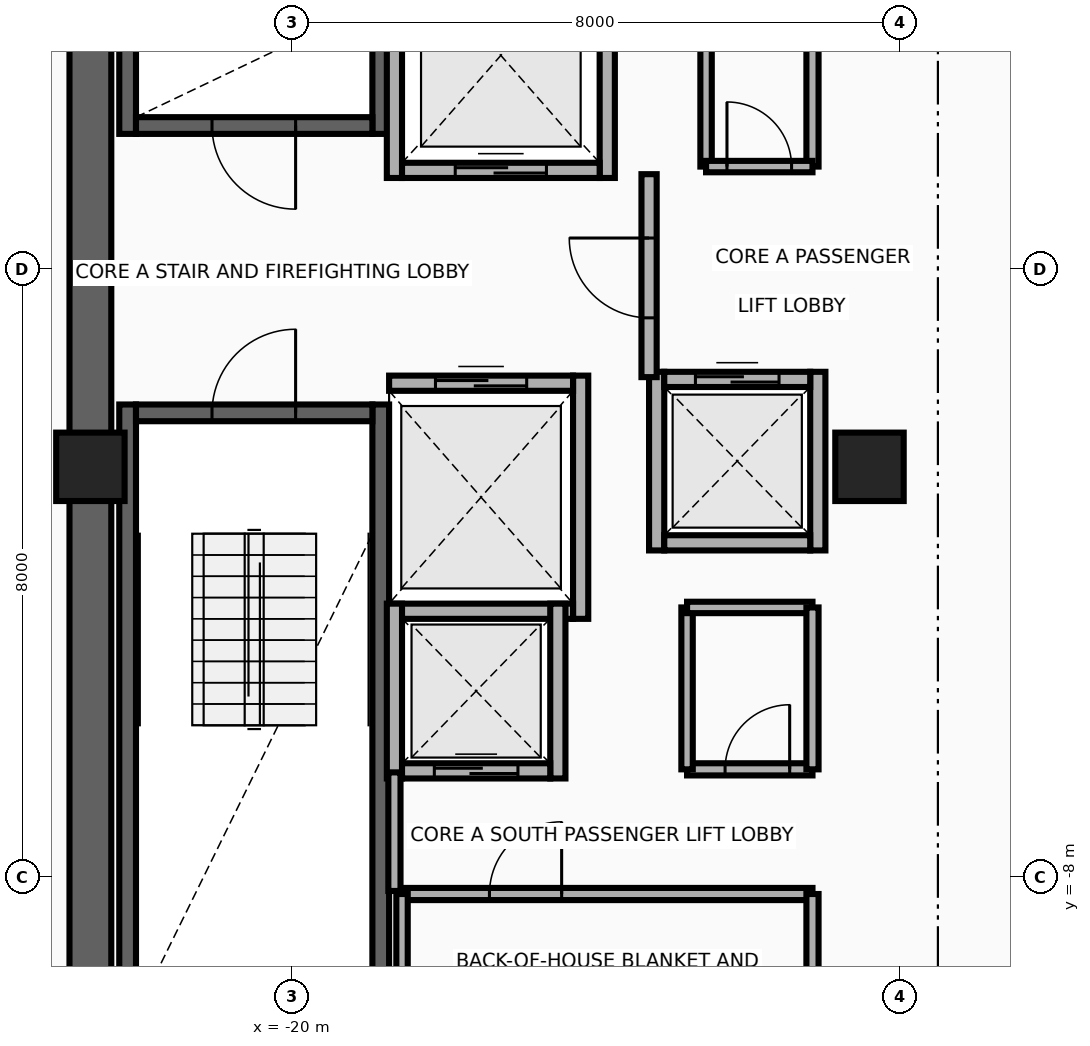
"""IFC4 building model, lengths in metres.
Left out: names, types, materials, properties, quantities, classifications, styles, units other than length and angle.
Written with IfcOpenShell. Run it as: python <this file> out.ifc"""

import sys

from ifc_helpers import new_model, si_unit, direction, frame, frame_2d, origin, origin_2d, place, context, subcontext, project, spatial, rectangle, extrude, source, transform, mapped, element, fill, save


model = new_model("IFC4")
c1 = context("Model", 3, precision=1e-05, world=origin(), true_north=direction((0.0, 1.0)))
c2 = subcontext(c1, "Body", "Model", "MODEL_VIEW")
j1 = project(units=[si_unit("LENGTHUNIT", "METRE"), si_unit("PLANEANGLEUNIT", "RADIAN")], contexts=[c1])
p1 = place(None, origin())
s1 = spatial("IfcSite", under=j1, at=p1, CompositionType="ELEMENT")
p2 = place(p1, origin())
s2 = spatial("IfcBuilding", under=s1, at=p2, CompositionType="ELEMENT")
p3 = place(p2, frame((0.0, 0.0, 212.5)))
s3 = spatial("IfcBuildingStorey", under=s2, at=p3, CompositionType="ELEMENT", Elevation=212.5)
for number, where, z_axis, x_axis in (
    (1, (-22.16, 1.78, 0.0), (0.0, 0.0, 1.0), (0.0, 1.0, 0.0)),
    (2, (-18.83, 1.78, 0.0), (0.0, 0.0, 1.0), (0.0, 1.0, 0.0)),
):
    element("IfcWall", number, at=place(p3, frame(where, z_axis=z_axis, x_axis=x_axis)), inside=s3, PredefinedType="SHEAR", context=c2, shape_type="SweptSolid", body=[
        extrude(rectangle(XDim=8.745, YDim=0.22, at=frame_2d((4.373, 0.0))), origin(), (0.0, 0.0, 1.0), 3.26),
    ])
p4 = place(p3, frame((-22.05, 1.89, 0.0), z_axis=(0.0, 0.0, 1.0), x_axis=(1.0, 0.0, 0.0)))
e3 = element("IfcWall", 3, at=p4, inside=s3, PredefinedType="SHEAR", context=c2, shape_type="SweptSolid", body=[
    extrude(rectangle(XDim=3.11, YDim=0.22, at=frame_2d((1.555, 0.0))), origin(), (0.0, 0.0, 1.0), 3.26),
])
p5 = place(p4, frame((1.0, 0.0, 0.0)))
e4 = element("IfcOpeningElement", 4, at=p5, cuts=e3, PredefinedType="OPENING", context=c2, shape_type="SweptSolid", body=[
    extrude(rectangle(XDim=1.1, YDim=2.15, at=frame_2d((0.55, 1.075))), frame((0.0, 0.125, 0.0), z_axis=(0.0, -1.0, 0.0), x_axis=(1.0, 0.0, 0.0)), (0.0, 0.0, 1.0), 0.25),
])
for number, where, z_axis, x_axis in (
    (5, (-22.16, -10.525, 0.0), (0.0, 0.0, 1.0), (0.0, 1.0, 0.0)),
    (6, (-18.83, -10.525, 0.0), (0.0, 0.0, 1.0), (0.0, 1.0, 0.0)),
):
    element("IfcWall", number, at=place(p3, frame(where, z_axis=z_axis, x_axis=x_axis)), inside=s3, PredefinedType="SHEAR", context=c2, shape_type="SweptSolid", body=[
        extrude(rectangle(XDim=8.745, YDim=0.22, at=frame_2d((4.373, 0.0))), origin(), (0.0, 0.0, 1.0), 3.26),
    ])
p6 = place(p3, frame((-22.05, -1.89, 0.0), z_axis=(0.0, 0.0, 1.0), x_axis=(1.0, 0.0, 0.0)))
e7 = element("IfcWall", 7, at=p6, inside=s3, PredefinedType="SHEAR", context=c2, shape_type="SweptSolid", body=[
    extrude(rectangle(XDim=3.11, YDim=0.22, at=frame_2d((1.555, 0.0))), origin(), (0.0, 0.0, 1.0), 3.26),
])
p7 = place(p6, frame((1.0, 0.0, 0.0)))
e8 = element("IfcOpeningElement", 8, at=p7, cuts=e7, PredefinedType="OPENING", context=c2, shape_type="SweptSolid", body=[
    extrude(rectangle(XDim=1.1, YDim=2.15, at=frame_2d((0.55, 1.075))), frame((0.0, 0.125, 0.0), z_axis=(0.0, -1.0, 0.0), x_axis=(1.0, 0.0, 0.0)), (0.0, 0.0, 1.0), 0.25),
])
p8 = place(p3, frame((-22.65, -11.075, 0.0), z_axis=(0.0, 0.0, 1.0), x_axis=(0.0, 1.0, 0.0)))
e9 = element("IfcWall", 9, at=p8, inside=s3, PredefinedType="SHEAR", context=c2, shape_type="SweptSolid", body=[
    extrude(rectangle(XDim=22.15, YDim=0.55, at=frame_2d((11.075, 0.0))), origin(), (0.0, 0.0, 1.0), 3.26),
])
m1 = source(origin(), c2, "Body", "SweptSolid", [
    extrude(rectangle(XDim=0.9, YDim=0.9, at=origin_2d()), origin(), (0.0, 0.0, 1.0), 3.5),
])
for number, where, z_axis, x_axis in (
    (10, (-22.65, -2.6, 0.0), (0.0, 0.0, 1.0), (1.0, 0.0, 0.0)),
    (11, (-12.4, -2.6, 0.0), (0.0, 0.0, 1.0), (1.0, 0.0, 0.0)),
):
    element("IfcColumn", number, at=place(p3, frame(where, z_axis=z_axis, x_axis=x_axis)), inside=s3, PredefinedType="COLUMN", context=c2, shape_type="MappedRepresentation", body=[
        mapped(m1, transform((0.0, 0.0, 0.0), x_axis=(1.0, 0.0, 0.0), y_axis=(0.0, 1.0, 0.0), z_axis=(0.0, 0.0, 1.0), scale=1.0)),
    ])
for number, where, z_axis, x_axis in (
    (12, (-18.65, 1.2, 0.0), (0.0, 0.0, 1.0), (0.0, 1.0, 0.0)),
    (13, (-15.85, 1.2, 0.0), (0.0, 0.0, 1.0), (0.0, 1.0, 0.0)),
):
    element("IfcWall", number, at=place(p3, frame(where, z_axis=z_axis, x_axis=x_axis)), inside=s3, PredefinedType="MOVABLE", context=c2, shape_type="SweptSolid", body=[
        extrude(rectangle(XDim=3.225, YDim=0.2, at=frame_2d((1.613, 0.0))), origin(), (0.0, 0.0, 1.0), 3.26),
    ])
p9 = place(p3, frame((-18.55, 1.3, 0.0), z_axis=(0.0, 0.0, 1.0), x_axis=(1.0, 0.0, 0.0)))
e14 = element("IfcWall", 14, at=p9, inside=s3, PredefinedType="MOVABLE", context=c2, shape_type="SweptSolid", body=[
    extrude(rectangle(XDim=2.6, YDim=0.2, at=frame_2d((1.3, 0.0))), origin(), (0.0, 0.0, 1.0), 3.26),
])
p10 = place(p9, frame((0.7, 0.0, 0.0)))
e15 = element("IfcOpeningElement", 15, at=p10, cuts=e14, PredefinedType="OPENING", context=c2, shape_type="SweptSolid", body=[
    extrude(rectangle(XDim=1.2, YDim=2.1, at=frame_2d((0.6, 1.05))), frame((0.0, 0.115, 0.0), z_axis=(0.0, -1.0, 0.0), x_axis=(1.0, 0.0, 0.0)), (0.0, 0.0, 1.0), 0.23),
])
p11 = place(p3, frame((-16.2, -4.6, 0.0), z_axis=(0.0, 0.0, 1.0), x_axis=(0.0, 1.0, 0.0)))
e16 = element("IfcWall", 16, at=p11, inside=s3, PredefinedType="MOVABLE", context=c2, shape_type="SweptSolid", body=[
    extrude(rectangle(XDim=3.2, YDim=0.2, at=frame_2d((1.6, 0.0))), origin(), (0.0, 0.0, 1.0), 3.26),
])
p12 = place(p3, frame((-18.72, -4.5, 0.0), z_axis=(0.0, 0.0, 1.0), x_axis=(1.0, 0.0, 0.0)))
e17 = element("IfcWall", 17, at=p12, inside=s3, PredefinedType="MOVABLE", context=c2, shape_type="SweptSolid", body=[
    extrude(rectangle(XDim=2.42, YDim=0.2, at=frame_2d((1.21, 0.0))), origin(), (0.0, 0.0, 1.0), 3.26),
])
p13 = place(p3, frame((-18.72, -1.5, 0.0), z_axis=(0.0, 0.0, 1.0), x_axis=(1.0, 0.0, 0.0)))
e18 = element("IfcWall", 18, at=p13, inside=s3, PredefinedType="MOVABLE", context=c2, shape_type="SweptSolid", body=[
    extrude(rectangle(XDim=2.42, YDim=0.2, at=frame_2d((1.21, 0.0))), origin(), (0.0, 0.0, 1.0), 3.26),
])
p14 = place(p13, frame((0.61, 0.0, 0.0)))
e19 = element("IfcOpeningElement", 19, at=p14, cuts=e18, PredefinedType="OPENING", context=c2, shape_type="SweptSolid", body=[
    extrude(rectangle(XDim=1.2, YDim=2.1, at=frame_2d((0.6, 1.05))), frame((0.0, 0.115, 0.0), z_axis=(0.0, -1.0, 0.0), x_axis=(1.0, 0.0, 0.0)), (0.0, 0.0, 1.0), 0.23),
])
for number, where, z_axis, x_axis in (
    (20, (-18.65, -6.7, 0.0), (0.0, 0.0, 1.0), (0.0, 1.0, 0.0)),
    (21, (-16.5, -6.7, 0.0), (0.0, 0.0, 1.0), (0.0, 1.0, 0.0)),
):
    element("IfcWall", number, at=place(p3, frame(where, z_axis=z_axis, x_axis=x_axis)), inside=s3, PredefinedType="MOVABLE", context=c2, shape_type="SweptSolid", body=[
        extrude(rectangle(XDim=2.3, YDim=0.2, at=frame_2d((1.15, 0.0))), origin(), (0.0, 0.0, 1.0), 3.26),
    ])
p15 = place(p3, frame((-18.55, -6.6, 0.0), z_axis=(0.0, 0.0, 1.0), x_axis=(1.0, 0.0, 0.0)))
e22 = element("IfcWall", 22, at=p15, inside=s3, PredefinedType="MOVABLE", context=c2, shape_type="SweptSolid", body=[
    extrude(rectangle(XDim=1.95, YDim=0.2, at=frame_2d((0.975, 0.0))), origin(), (0.0, 0.0, 1.0), 3.26),
])
p16 = place(p15, frame((0.425, 0.0, 0.0)))
e23 = element("IfcOpeningElement", 23, at=p16, cuts=e22, PredefinedType="OPENING", context=c2, shape_type="SweptSolid", body=[
    extrude(rectangle(XDim=1.1, YDim=2.1, at=frame_2d((0.55, 1.05))), frame((0.0, 0.115, 0.0), z_axis=(0.0, -1.0, 0.0), x_axis=(1.0, 0.0, 0.0)), (0.0, 0.0, 1.0), 0.23),
])
for number, where, z_axis, x_axis in (
    (24, (-15.2, -3.7, 0.0), (0.0, 0.0, 1.0), (0.0, 1.0, 0.0)),
    (25, (-13.08, -3.7, 0.0), (0.0, 0.0, 1.0), (0.0, 1.0, 0.0)),
):
    element("IfcWall", number, at=place(p3, frame(where, z_axis=z_axis, x_axis=x_axis)), inside=s3, PredefinedType="MOVABLE", context=c2, shape_type="SweptSolid", body=[
        extrude(rectangle(XDim=2.35, YDim=0.2, at=frame_2d((1.175, 0.0))), origin(), (0.0, 0.0, 1.0), 3.26),
    ])
p17 = place(p3, frame((-15.1, -3.6, 0.0), z_axis=(0.0, 0.0, 1.0), x_axis=(1.0, 0.0, 0.0)))
e26 = element("IfcWall", 26, at=p17, inside=s3, PredefinedType="MOVABLE", context=c2, shape_type="SweptSolid", body=[
    extrude(rectangle(XDim=1.92, YDim=0.2, at=frame_2d((0.96, 0.0))), origin(), (0.0, 0.0, 1.0), 3.26),
])
p18 = place(p3, frame((-15.1, -1.45, 0.0), z_axis=(0.0, 0.0, 1.0), x_axis=(1.0, 0.0, 0.0)))
e27 = element("IfcWall", 27, at=p18, inside=s3, PredefinedType="MOVABLE", context=c2, shape_type="SweptSolid", body=[
    extrude(rectangle(XDim=1.92, YDim=0.2, at=frame_2d((0.96, 0.0))), origin(), (0.0, 0.0, 1.0), 3.26),
])
p19 = place(p18, frame((0.41, 0.0, 0.0)))
e28 = element("IfcOpeningElement", 28, at=p19, cuts=e27, PredefinedType="OPENING", context=c2, shape_type="SweptSolid", body=[
    extrude(rectangle(XDim=1.1, YDim=2.1, at=frame_2d((0.55, 1.05))), frame((0.0, 0.115, 0.0), z_axis=(0.0, -1.0, 0.0), x_axis=(1.0, 0.0, 0.0)), (0.0, 0.0, 1.0), 0.23),
])
p20 = place(p3, frame((-15.3, -1.42, 0.0), z_axis=(0.0, 0.0, 1.0), x_axis=(0.0, 1.0, 0.0)))
e29 = element("IfcWall", 29, at=p20, inside=s3, PredefinedType="PARTITIONING", context=c2, shape_type="SweptSolid", body=[
    extrude(rectangle(XDim=2.67, YDim=0.2, at=frame_2d((1.335, 0.0))), origin(), (0.0, 0.0, 1.0), 3.26),
])
p21 = place(p20, frame((0.78, 0.0, 0.0)))
e30 = element("IfcOpeningElement", 30, at=p21, cuts=e29, PredefinedType="OPENING", context=c2, shape_type="SweptSolid", body=[
    extrude(rectangle(XDim=1.05, YDim=2.15, at=frame_2d((0.525, 1.075))), frame((0.0, 0.115, 0.0), z_axis=(0.0, -1.0, 0.0), x_axis=(1.0, 0.0, 0.0)), (0.0, 0.0, 1.0), 0.23),
])
p22 = place(p3, frame((-18.65, -8.18, 0.0), z_axis=(0.0, 0.0, 1.0), x_axis=(0.0, 1.0, 0.0)))
e31 = element("IfcWall", 31, at=p22, inside=s3, PredefinedType="PARTITIONING", context=c2, shape_type="SweptSolid", body=[
    extrude(rectangle(XDim=1.56, YDim=0.16, at=frame_2d((0.78, 0.0))), origin(), (0.0, 0.0, 1.0), 3.26),
])
p23 = place(p3, frame((-18.55, -8.22, 0.0), z_axis=(0.0, 0.0, 1.0), x_axis=(1.0, 0.0, 0.0)))
e32 = element("IfcWall", 32, at=p23, inside=s3, PredefinedType="PARTITIONING", context=c2, shape_type="SweptSolid", body=[
    extrude(rectangle(XDim=5.4, YDim=0.16, at=frame_2d((2.7, 0.0))), origin(), (0.0, 0.0, 1.0), 3.26),
])
p24 = place(p23, frame((1.15, 0.0, 0.0)))
e33 = element("IfcOpeningElement", 33, at=p24, cuts=e32, PredefinedType="OPENING", context=c2, shape_type="SweptSolid", body=[
    extrude(rectangle(XDim=0.95, YDim=2.15, at=frame_2d((0.475, 1.075))), frame((0.0, 0.095, 0.0), z_axis=(0.0, -1.0, 0.0), x_axis=(1.0, 0.0, 0.0)), (0.0, 0.0, 1.0), 0.19),
])
p25 = place(p3, frame((-18.55, -10.35, 0.0), z_axis=(0.0, 0.0, 1.0), x_axis=(0.0, 1.0, 0.0)))
e34 = element("IfcWall", 34, at=p25, inside=s3, PredefinedType="PARTITIONING", context=c2, shape_type="SweptSolid", body=[
    extrude(rectangle(XDim=2.13, YDim=0.15, at=frame_2d((1.065, 0.0))), origin(), (0.0, 0.0, 1.0), 3.26),
])
p26 = place(p3, frame((-13.15, -10.35, 0.0), z_axis=(0.0, 0.0, 1.0), x_axis=(0.0, 1.0, 0.0)))
e35 = element("IfcWall", 35, at=p26, inside=s3, PredefinedType="PARTITIONING", context=c2, shape_type="SweptSolid", body=[
    extrude(rectangle(XDim=2.13, YDim=0.16, at=frame_2d((1.065, 0.0))), origin(), (0.0, 0.0, 1.0), 3.26),
])
p27 = place(p3, frame((-14.8, -6.58, 0.0), z_axis=(0.0, 0.0, 1.0), x_axis=(1.0, 0.0, 0.0)))
e36 = element("IfcWall", 36, at=p27, inside=s3, PredefinedType="PARTITIONING", context=c2, shape_type="SweptSolid", body=[
    extrude(rectangle(XDim=1.65, YDim=0.16, at=frame_2d((0.825, 0.0))), origin(), (0.0, 0.0, 1.0), 3.26),
])
p28 = place(p27, frame((0.5, 0.0, 0.0)))
e37 = element("IfcOpeningElement", 37, at=p28, cuts=e36, PredefinedType="OPENING", context=c2, shape_type="SweptSolid", body=[
    extrude(rectangle(XDim=0.85, YDim=2.05, at=frame_2d((0.425, 1.025))), frame((0.0, 0.095, 0.0), z_axis=(0.0, -1.0, 0.0), x_axis=(1.0, 0.0, 0.0)), (0.0, 0.0, 1.0), 0.19),
])
p29 = place(p3, frame((-14.8, -6.58, 0.0), z_axis=(0.0, 0.0, 1.0), x_axis=(0.0, 1.0, 0.0)))
e38 = element("IfcWall", 38, at=p29, inside=s3, PredefinedType="PARTITIONING", context=c2, shape_type="SweptSolid", body=[
    extrude(rectangle(XDim=2.13, YDim=0.15, at=frame_2d((1.065, 0.0))), origin(), (0.0, 0.0, 1.0), 3.26),
])
p30 = place(p3, frame((-14.8, -4.45, 0.0), z_axis=(0.0, 0.0, 1.0), x_axis=(1.0, 0.0, 0.0)))
e39 = element("IfcWall", 39, at=p30, inside=s3, PredefinedType="PARTITIONING", context=c2, shape_type="SweptSolid", body=[
    extrude(rectangle(XDim=1.65, YDim=0.15, at=frame_2d((0.825, 0.0))), origin(), (0.0, 0.0, 1.0), 3.26),
])
p31 = place(p3, frame((-13.15, -6.58, 0.0), z_axis=(0.0, 0.0, 1.0), x_axis=(0.0, 1.0, 0.0)))
e40 = element("IfcWall", 40, at=p31, inside=s3, PredefinedType="PARTITIONING", context=c2, shape_type="SweptSolid", body=[
    extrude(rectangle(XDim=2.13, YDim=0.16, at=frame_2d((1.065, 0.0))), origin(), (0.0, 0.0, 1.0), 3.26),
])
p32 = place(p3, frame((-13.15, 1.35, 0.0), z_axis=(0.0, 0.0, 1.0), x_axis=(0.0, 1.0, 0.0)))
e41 = element("IfcWall", 41, at=p32, inside=s3, PredefinedType="PARTITIONING", context=c2, shape_type="SweptSolid", body=[
    extrude(rectangle(XDim=1.95, YDim=0.16, at=frame_2d((0.975, 0.0))), origin(), (0.0, 0.0, 1.0), 3.26),
])
p33 = place(p3, frame((-14.55, 1.35, 0.0), z_axis=(0.0, 0.0, 1.0), x_axis=(0.0, 1.0, 0.0)))
e42 = element("IfcWall", 42, at=p33, inside=s3, PredefinedType="PARTITIONING", context=c2, shape_type="SweptSolid", body=[
    extrude(rectangle(XDim=1.95, YDim=0.15, at=frame_2d((0.975, 0.0))), origin(), (0.0, 0.0, 1.0), 3.26),
])
p34 = place(p3, frame((-14.55, 1.35, 0.0), z_axis=(0.0, 0.0, 1.0), x_axis=(1.0, 0.0, 0.0)))
e43 = element("IfcWall", 43, at=p34, inside=s3, PredefinedType="PARTITIONING", context=c2, shape_type="SweptSolid", body=[
    extrude(rectangle(XDim=1.4, YDim=0.15, at=frame_2d((0.7, 0.0))), origin(), (0.0, 0.0, 1.0), 3.26),
])
p35 = place(p34, frame((0.275, 0.0, 0.0)))
e44 = element("IfcOpeningElement", 44, at=p35, cuts=e43, PredefinedType="OPENING", context=c2, shape_type="SweptSolid", body=[
    extrude(rectangle(XDim=0.85, YDim=2.05, at=frame_2d((0.425, 1.025))), frame((0.0, 0.09, 0.0), z_axis=(0.0, -1.0, 0.0), x_axis=(1.0, 0.0, 0.0)), (0.0, 0.0, 1.0), 0.18),
])
p36 = place(p10, origin())
e45 = element("IfcDoor", 45, at=p36, inside=s3, OperationType="DOUBLE_DOOR_SLIDING", PredefinedType="DOOR", context=c2, shape_type="SweptSolid", body=[
    extrude(rectangle(XDim=1.2, YDim=2.1, at=frame_2d((0.6, 1.05))), frame((0.0, 0.025, 0.0), z_axis=(0.0, -1.0, 0.0), x_axis=(1.0, 0.0, 0.0)), (0.0, 0.0, 1.0), 0.05),
])
fill(e15, e45)
p37 = place(p14, origin())
e46 = element("IfcDoor", 46, at=p37, inside=s3, OperationType="DOUBLE_DOOR_SLIDING", PredefinedType="DOOR", context=c2, shape_type="SweptSolid", body=[
    extrude(rectangle(XDim=1.2, YDim=2.1, at=frame_2d((0.6, 1.05))), frame((0.0, 0.025, 0.0), z_axis=(0.0, -1.0, 0.0), x_axis=(1.0, 0.0, 0.0)), (0.0, 0.0, 1.0), 0.05),
])
fill(e19, e46)
p38 = place(p16, origin())
e47 = element("IfcDoor", 47, at=p38, inside=s3, OperationType="DOUBLE_DOOR_SLIDING", PredefinedType="DOOR", context=c2, shape_type="SweptSolid", body=[
    extrude(rectangle(XDim=1.1, YDim=2.1, at=frame_2d((0.55, 1.05))), frame((0.0, 0.025, 0.0), z_axis=(0.0, -1.0, 0.0), x_axis=(1.0, 0.0, 0.0)), (0.0, 0.0, 1.0), 0.05),
])
fill(e23, e47)
p39 = place(p19, origin())
e48 = element("IfcDoor", 48, at=p39, inside=s3, OperationType="DOUBLE_DOOR_SLIDING", PredefinedType="DOOR", context=c2, shape_type="SweptSolid", body=[
    extrude(rectangle(XDim=1.1, YDim=2.1, at=frame_2d((0.55, 1.05))), frame((0.0, 0.025, 0.0), z_axis=(0.0, -1.0, 0.0), x_axis=(1.0, 0.0, 0.0)), (0.0, 0.0, 1.0), 0.05),
])
fill(e28, e48)
p40 = place(p21, origin())
e49 = element("IfcDoor", 49, at=p40, inside=s3, OperationType="SINGLE_SWING_RIGHT", PredefinedType="DOOR", context=c2, shape_type="SweptSolid", body=[
    extrude(rectangle(XDim=1.05, YDim=2.15, at=frame_2d((0.525, 1.075))), frame((0.0, 0.025, 0.0), z_axis=(0.0, -1.0, 0.0), x_axis=(1.0, 0.0, 0.0)), (0.0, 0.0, 1.0), 0.05),
])
fill(e30, e49)
p41 = place(p5, frame((1.1, 0.0, 0.0), z_axis=(0.0, 0.0, 1.0), x_axis=(-1.0, 0.0, 0.0)))
e50 = element("IfcDoor", 50, at=p41, inside=s3, OperationType="SINGLE_SWING_LEFT", PredefinedType="DOOR", context=c2, shape_type="SweptSolid", body=[
    extrude(rectangle(XDim=1.1, YDim=2.15, at=frame_2d((0.55, 1.075))), frame((0.0, 0.025, 0.0), z_axis=(0.0, -1.0, 0.0), x_axis=(1.0, 0.0, 0.0)), (0.0, 0.0, 1.0), 0.05),
])
fill(e4, e50)
p42 = place(p7, origin())
e51 = element("IfcDoor", 51, at=p42, inside=s3, OperationType="SINGLE_SWING_RIGHT", PredefinedType="DOOR", context=c2, shape_type="SweptSolid", body=[
    extrude(rectangle(XDim=1.1, YDim=2.15, at=frame_2d((0.55, 1.075))), frame((0.0, 0.025, 0.0), z_axis=(0.0, -1.0, 0.0), x_axis=(1.0, 0.0, 0.0)), (0.0, 0.0, 1.0), 0.05),
])
fill(e8, e51)
p43 = place(p24, origin())
e52 = element("IfcDoor", 52, at=p43, inside=s3, OperationType="SINGLE_SWING_RIGHT", PredefinedType="DOOR", context=c2, shape_type="SweptSolid", body=[
    extrude(rectangle(XDim=0.95, YDim=2.15, at=frame_2d((0.475, 1.075))), frame((0.0, 0.025, 0.0), z_axis=(0.0, -1.0, 0.0), x_axis=(1.0, 0.0, 0.0)), (0.0, 0.0, 1.0), 0.05),
])
fill(e33, e52)
p44 = place(p28, origin())
e53 = element("IfcDoor", 53, at=p44, inside=s3, OperationType="SINGLE_SWING_LEFT", PredefinedType="DOOR", context=c2, shape_type="SweptSolid", body=[
    extrude(rectangle(XDim=0.85, YDim=2.05, at=frame_2d((0.425, 1.025))), frame((0.0, 0.025, 0.0), z_axis=(0.0, -1.0, 0.0), x_axis=(1.0, 0.0, 0.0)), (0.0, 0.0, 1.0), 0.05),
])
fill(e37, e53)
p45 = place(p35, origin())
e54 = element("IfcDoor", 54, at=p45, inside=s3, OperationType="SINGLE_SWING_RIGHT", PredefinedType="DOOR", context=c2, shape_type="SweptSolid", body=[
    extrude(rectangle(XDim=0.85, YDim=2.05, at=frame_2d((0.425, 1.025))), frame((0.0, 0.025, 0.0), z_axis=(0.0, -1.0, 0.0), x_axis=(1.0, 0.0, 0.0)), (0.0, 0.0, 1.0), 0.05),
])
fill(e44, e54)
save(model, sys.argv[1])
